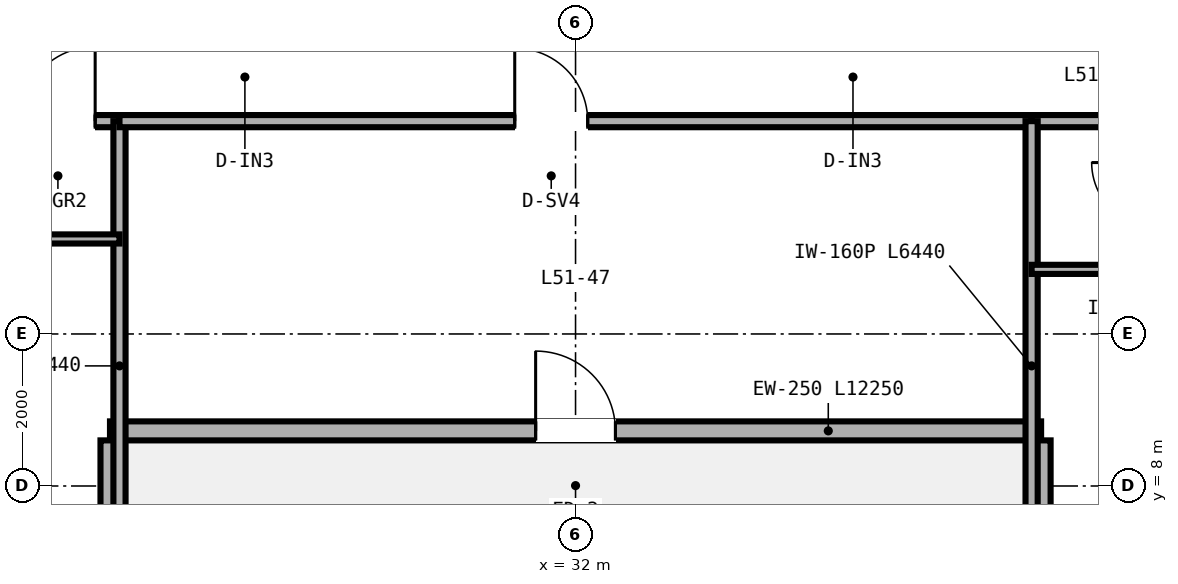
"""IFC4 building model, lengths in metres.
Left out: names, types, materials, properties, quantities, classifications, styles, units other than length and angle.
Written with IfcOpenShell. Run it as: python <this file> out.ifc"""

import sys

from ifc_helpers import new_model, si_unit, direction, frame, frame_2d, origin, place, context, subcontext, project, spatial, rectangle, extrude, source, transform, mapped, element, fill, save


model = new_model("IFC4")
c1 = context("Model", 3, precision=1e-05, world=origin(), true_north=direction((0.0, 1.0)))
c2 = subcontext(c1, "Body", "Model", "MODEL_VIEW")
j1 = project(units=[si_unit("LENGTHUNIT", "METRE"), si_unit("PLANEANGLEUNIT", "RADIAN")], contexts=[c1])
p1 = place(None, origin())
s1 = spatial("IfcSite", under=j1, at=p1, CompositionType="ELEMENT")
p2 = place(p1, origin())
s2 = spatial("IfcBuilding", under=s1, at=p2, CompositionType="ELEMENT")
p3 = place(p2, frame((0.0, 0.0, 202.8)))
s3 = spatial("IfcBuildingStorey", under=s2, at=p3, CompositionType="ELEMENT", Elevation=202.8)
p4 = place(p3, frame((25.875, 8.725, 0.0), z_axis=(0.0, 0.0, 1.0), x_axis=(1.0, 0.0, 0.0)))
e1 = element("IfcWall", 1, at=p4, inside=s3, PredefinedType="SOLIDWALL", context=c2, shape_type="SweptSolid", body=[
    extrude(rectangle(XDim=12.25, YDim=0.25, at=frame_2d((6.125, 0.0))), origin(), (0.0, 0.0, 1.0), 3.37),
])
p5 = place(p4, frame((5.6, 0.0, 0.0)))
e2 = element("IfcOpeningElement", 2, at=p5, cuts=e1, PredefinedType="OPENING", context=c2, shape_type="SweptSolid", body=[
    extrude(rectangle(XDim=1.05, YDim=2.15, at=frame_2d((0.525, 1.075))), frame((0.0, 0.135, 0.0), z_axis=(0.0, -1.0, 0.0), x_axis=(1.0, 0.0, 0.0)), (0.0, 0.0, 1.0), 0.27),
])
for number, where, z_axis, x_axis in (
    (3, (25.875, 6.1, 0.0), (0.0, 0.0, 1.0), (0.0, 1.0, 0.0)),
    (4, (38.125, 6.1, 0.0), (0.0, 0.0, 1.0), (0.0, 1.0, 0.0)),
):
    element("IfcWall", number, at=place(p3, frame(where, z_axis=z_axis, x_axis=x_axis)), inside=s3, PredefinedType="SOLIDWALL", context=c2, shape_type="SweptSolid", body=[
        extrude(rectangle(XDim=2.5, YDim=0.25, at=frame_2d((1.25, 0.0))), origin(), (0.0, 0.0, 1.0), 2.443),
    ])
p6 = place(p3, frame((14.0, 12.8, 0.0), z_axis=(0.0, 0.0, 1.0), x_axis=(1.0, 0.0, 0.0)))
e5 = element("IfcWall", 5, at=p6, inside=s3, PredefinedType="PARTITIONING", context=c2, shape_type="SweptSolid", body=[
    extrude(rectangle(XDim=12.0, YDim=0.16, at=frame_2d((6.0, 0.0))), origin(), (0.0, 0.0, 1.0), 2.913),
])
p7 = place(p6, frame((3.34, 0.0, 0.0)))
e6 = element("IfcOpeningElement", 6, at=p7, cuts=e5, PredefinedType="OPENING", context=c2, shape_type="SweptSolid", body=[
    extrude(rectangle(XDim=0.94, YDim=2.15, at=frame_2d((0.47, 1.075))), frame((0.0, 0.09, 0.0), z_axis=(0.0, -1.0, 0.0), x_axis=(1.0, 0.0, 0.0)), (0.0, 0.0, 1.0), 0.18),
])
p8 = place(p6, frame((10.7, 0.0, 0.0)))
e7 = element("IfcOpeningElement", 7, at=p8, cuts=e5, PredefinedType="OPENING", context=c2, shape_type="SweptSolid", body=[
    extrude(rectangle(XDim=0.98, YDim=2.2, at=frame_2d((0.49, 1.1))), frame((0.0, 0.09, 0.0), z_axis=(0.0, -1.0, 0.0), x_axis=(1.0, 0.0, 0.0)), (0.0, 0.0, 1.0), 0.18),
])
p9 = place(p3, frame((26.0, 6.36, 0.0), z_axis=(0.0, 0.0, 1.0), x_axis=(0.0, 1.0, 0.0)))
e8 = element("IfcWall", 8, at=p9, inside=s3, PredefinedType="PARTITIONING", context=c2, shape_type="SweptSolid", body=[
    extrude(rectangle(XDim=6.44, YDim=0.16, at=frame_2d((3.22, 0.0))), origin(), (0.0, 0.0, 1.0), 2.443),
])
p10 = place(p3, frame((24.9, 11.25, 0.0), z_axis=(0.0, 0.0, 1.0), x_axis=(1.0, 0.0, 0.0)))
e9 = element("IfcWall", 9, at=p10, inside=s3, PredefinedType="PARTITIONING", context=c2, shape_type="SweptSolid", body=[
    extrude(rectangle(XDim=1.1, YDim=0.12, at=frame_2d((0.55, 0.0))), origin(), (0.0, 0.0, 1.0), 3.37),
])
p11 = place(p3, frame((26.0, 12.8, 0.0), z_axis=(0.0, 0.0, 1.0), x_axis=(1.0, 0.0, 0.0)))
e10 = element("IfcWall", 10, at=p11, inside=s3, PredefinedType="PARTITIONING", context=c2, shape_type="SweptSolid", body=[
    extrude(rectangle(XDim=12.0, YDim=0.16, at=frame_2d((6.0, 0.0))), origin(), (0.0, 0.0, 1.0), 3.37),
])
p12 = place(p11, frame((5.2, 0.0, 0.0)))
e11 = element("IfcOpeningElement", 11, at=p12, cuts=e10, PredefinedType="OPENING", context=c2, shape_type="SweptSolid", body=[
    extrude(rectangle(XDim=0.96, YDim=2.15, at=frame_2d((0.48, 1.075))), frame((0.0, 0.09, 0.0), z_axis=(0.0, -1.0, 0.0), x_axis=(1.0, 0.0, 0.0)), (0.0, 0.0, 1.0), 0.18),
])
p13 = place(p3, frame((38.0, 12.8, 0.0), z_axis=(0.0, 0.0, 1.0), x_axis=(1.0, 0.0, 0.0)))
e12 = element("IfcWall", 12, at=p13, inside=s3, PredefinedType="PARTITIONING", context=c2, shape_type="SweptSolid", body=[
    extrude(rectangle(XDim=12.0, YDim=0.16, at=frame_2d((6.0, 0.0))), origin(), (0.0, 0.0, 1.0), 2.913),
])
p14 = place(p13, frame((3.14, 0.0, 0.0)))
e13 = element("IfcOpeningElement", 13, at=p14, cuts=e12, PredefinedType="OPENING", context=c2, shape_type="SweptSolid", body=[
    extrude(rectangle(XDim=0.94, YDim=2.15, at=frame_2d((0.47, 1.075))), frame((0.0, 0.09, 0.0), z_axis=(0.0, -1.0, 0.0), x_axis=(1.0, 0.0, 0.0)), (0.0, 0.0, 1.0), 0.18),
])
p15 = place(p13, frame((6.94, 0.0, 0.0)))
e14 = element("IfcOpeningElement", 14, at=p15, cuts=e12, PredefinedType="OPENING", context=c2, shape_type="SweptSolid", body=[
    extrude(rectangle(XDim=0.94, YDim=2.15, at=frame_2d((0.47, 1.075))), frame((0.0, 0.09, 0.0), z_axis=(0.0, -1.0, 0.0), x_axis=(1.0, 0.0, 0.0)), (0.0, 0.0, 1.0), 0.18),
])
p16 = place(p13, frame((10.74, 0.0, 0.0)))
e15 = element("IfcOpeningElement", 15, at=p16, cuts=e12, PredefinedType="OPENING", context=c2, shape_type="SweptSolid", body=[
    extrude(rectangle(XDim=0.94, YDim=2.15, at=frame_2d((0.47, 1.075))), frame((0.0, 0.09, 0.0), z_axis=(0.0, -1.0, 0.0), x_axis=(1.0, 0.0, 0.0)), (0.0, 0.0, 1.0), 0.18),
])
p17 = place(p3, frame((38.0, 6.36, 0.0), z_axis=(0.0, 0.0, 1.0), x_axis=(0.0, 1.0, 0.0)))
e16 = element("IfcWall", 16, at=p17, inside=s3, PredefinedType="PARTITIONING", context=c2, shape_type="SweptSolid", body=[
    extrude(rectangle(XDim=6.44, YDim=0.16, at=frame_2d((3.22, 0.0))), origin(), (0.0, 0.0, 1.0), 2.443),
])
p18 = place(p3, frame((38.0, 10.85, 0.0), z_axis=(0.0, 0.0, 1.0), x_axis=(1.0, 0.0, 0.0)))
e17 = element("IfcWall", 17, at=p18, inside=s3, PredefinedType="PARTITIONING", context=c2, shape_type="SweptSolid", body=[
    extrude(rectangle(XDim=1.65, YDim=0.12, at=frame_2d((0.825, 0.0))), origin(), (0.0, 0.0, 1.0), 3.37),
])
m1 = source(origin(), c2, "Body", "SweptSolid", [
    extrude(rectangle(XDim=1.05, YDim=2.15, at=frame_2d((0.525, 1.075))), frame((0.0, 0.025, 0.0), z_axis=(0.0, -1.0, 0.0), x_axis=(1.0, 0.0, 0.0)), (0.0, 0.0, 1.0), 0.05),
])
p19 = place(p5, origin())
e18 = element("IfcDoor", 18, at=p19, inside=s3, OperationType="SINGLE_SWING_LEFT", PredefinedType="DOOR", context=c2, shape_type="MappedRepresentation", body=[
    mapped(m1, transform((0.0, 0.0, 0.0), scale=1.0)),
])
fill(e2, e18)
m2 = source(origin(), c2, "Body", "SweptSolid", [
    extrude(rectangle(XDim=0.98, YDim=2.2, at=frame_2d((0.49, 1.1))), frame((0.0, 0.025, 0.0), z_axis=(0.0, -1.0, 0.0), x_axis=(1.0, 0.0, 0.0)), (0.0, 0.0, 1.0), 0.05),
])
p20 = place(p8, origin())
e19 = element("IfcDoor", 19, at=p20, inside=s3, OperationType="SINGLE_SWING_RIGHT", PredefinedType="DOOR", context=c2, shape_type="MappedRepresentation", body=[
    mapped(m2, transform((0.0, 0.0, 0.0), scale=1.0)),
])
fill(e7, e19)
m3 = source(origin(), c2, "Body", "SweptSolid", [
    extrude(rectangle(XDim=0.96, YDim=2.15, at=frame_2d((0.48, 1.075))), frame((0.0, 0.025, 0.0), z_axis=(0.0, -1.0, 0.0), x_axis=(1.0, 0.0, 0.0)), (0.0, 0.0, 1.0), 0.05),
])
p21 = place(p12, origin())
e20 = element("IfcDoor", 20, at=p21, inside=s3, OperationType="SINGLE_SWING_LEFT", PredefinedType="DOOR", context=c2, shape_type="MappedRepresentation", body=[
    mapped(m3, transform((0.0, 0.0, 0.0), scale=1.0)),
])
fill(e11, e20)
save(model, sys.argv[1])
